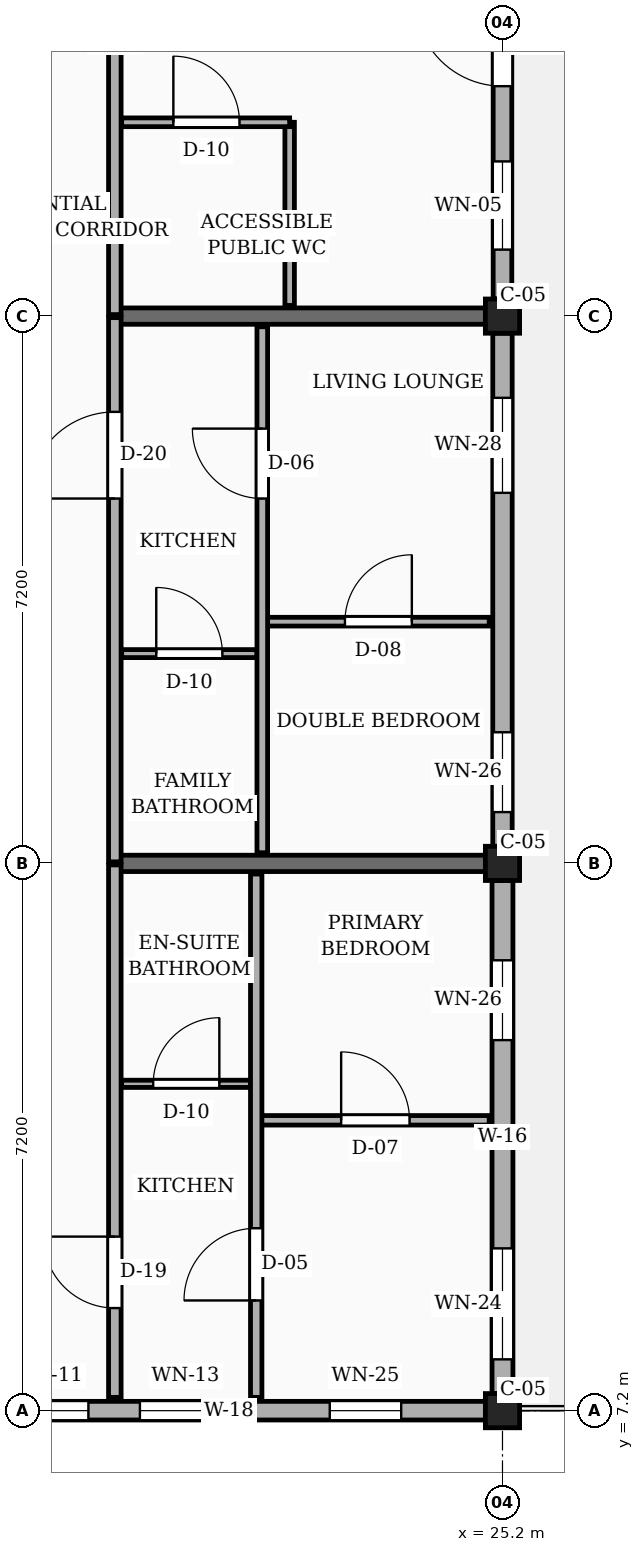
"""IFC4 building model, lengths in metres.
Left out: names, types, materials, properties, quantities, classifications, styles, units other than length and angle.
Written with IfcOpenShell. Run it as: python <this file> out.ifc"""

import sys

from ifc_helpers import new_model, si_unit, direction, frame, frame_2d, origin, origin_2d, place, context, subcontext, project, spatial, rectangle, extrude, element, fill, save


model = new_model("IFC4")
c1 = context("Model", 3, precision=1e-05, world=origin(), true_north=direction((0.0, 1.0)))
c2 = subcontext(c1, "Body", "Model", "MODEL_VIEW")
j1 = project(units=[si_unit("LENGTHUNIT", "METRE"), si_unit("PLANEANGLEUNIT", "RADIAN")], contexts=[c1])
p1 = place(None, origin())
s1 = spatial("IfcSite", under=j1, at=p1, CompositionType="ELEMENT")
p2 = place(p1, origin())
s2 = spatial("IfcBuilding", under=s1, at=p2, CompositionType="ELEMENT")
p3 = place(p2, frame((0.0, 0.0, 36.0)))
s3 = spatial("IfcBuildingStorey", under=s2, at=p3, CompositionType="ELEMENT", Elevation=36.0)
for number, where, z_axis, x_axis in (
    (1, (25.2, 7.2, 0.0), (0.0, 0.0, 1.0), (1.0, 0.0, 0.0)),
    (2, (25.2, 14.4, 0.0), (0.0, 0.0, 1.0), (1.0, 0.0, 0.0)),
    (3, (25.2, 21.6, 0.0), (0.0, 0.0, 1.0), (1.0, 0.0, 0.0)),
):
    element("IfcColumn", number, at=place(p3, frame(where, z_axis=z_axis, x_axis=x_axis)), inside=s3, PredefinedType="COLUMN", context=c2, shape_type="SweptSolid", body=[
        extrude(rectangle(XDim=0.45, YDim=0.45, at=origin_2d()), origin(), (0.0, 0.0, 1.0), 3.15),
    ])
for number, where, z_axis, x_axis in (
    (4, (20.1, 14.4, 0.0), (0.0, 0.0, 1.0), (1.0, 0.0, 0.0)),
    (5, (20.1, 21.6, 0.0), (0.0, 0.0, 1.0), (1.0, 0.0, 0.0)),
):
    element("IfcWall", number, at=place(p3, frame(where, z_axis=z_axis, x_axis=x_axis)), inside=s3, PredefinedType="SOLIDWALL", context=c2, shape_type="SweptSolid", body=[
        extrude(rectangle(XDim=4.875, YDim=0.215, at=frame_2d((2.438, 0.0))), origin(), (0.0, 0.0, 1.0), 2.17),
    ])
p4 = place(p3, frame((18.225, 7.2, 0.0), z_axis=(0.0, 0.0, 1.0), x_axis=(1.0, 0.0, 0.0)))
e6 = element("IfcWall", 6, at=p4, inside=s3, PredefinedType="SOLIDWALL", context=c2, shape_type="SweptSolid", body=[
    extrude(rectangle(XDim=6.75, YDim=0.245, at=frame_2d((3.375, 0.0))), origin(), (0.0, 0.0, 1.0), 2.44),
])
p5 = place(p4, frame((0.488, 0.0, 0.78)))
e7 = element("IfcOpeningElement", 7, at=p5, cuts=e6, PredefinedType="OPENING", context=c2, shape_type="SweptSolid", body=[
    extrude(rectangle(XDim=1.04, YDim=1.26, at=frame_2d((0.52, 0.63))), frame((0.0, 0.133, 0.0), z_axis=(0.0, -1.0, 0.0), x_axis=(1.0, 0.0, 0.0)), (0.0, 0.0, 1.0), 0.265),
])
p6 = place(p4, frame((2.205, 0.0, 0.78)))
e8 = element("IfcOpeningElement", 8, at=p6, cuts=e6, PredefinedType="OPENING", context=c2, shape_type="SweptSolid", body=[
    extrude(rectangle(XDim=1.2, YDim=1.26, at=frame_2d((0.6, 0.63))), frame((0.0, 0.133, 0.0), z_axis=(0.0, -1.0, 0.0), x_axis=(1.0, 0.0, 0.0)), (0.0, 0.0, 1.0), 0.265),
])
p7 = place(p4, frame((4.702, 0.0, 0.78)))
e9 = element("IfcOpeningElement", 9, at=p7, cuts=e6, PredefinedType="OPENING", context=c2, shape_type="SweptSolid", body=[
    extrude(rectangle(XDim=0.94, YDim=1.44, at=frame_2d((0.47, 0.72))), frame((0.0, 0.133, 0.0), z_axis=(0.0, -1.0, 0.0), x_axis=(1.0, 0.0, 0.0)), (0.0, 0.0, 1.0), 0.265),
])
p8 = place(p3, frame((25.2, 7.425, 0.0), z_axis=(0.0, 0.0, 1.0), x_axis=(0.0, 1.0, 0.0)))
e10 = element("IfcWall", 10, at=p8, inside=s3, PredefinedType="SOLIDWALL", context=c2, shape_type="SweptSolid", body=[
    extrude(rectangle(XDim=6.75, YDim=0.275, at=frame_2d((3.375, 0.0))), origin(), (0.0, 0.0, 1.0), 2.44),
])
p9 = place(p8, frame((0.45, 0.0, 0.78)))
e11 = element("IfcOpeningElement", 11, at=p9, cuts=e10, PredefinedType="OPENING", context=c2, shape_type="SweptSolid", body=[
    extrude(rectangle(XDim=1.46, YDim=1.36, at=frame_2d((0.73, 0.68))), frame((0.0, 0.147, 0.0), z_axis=(0.0, -1.0, 0.0), x_axis=(1.0, 0.0, 0.0)), (0.0, 0.0, 1.0), 0.295),
])
p10 = place(p8, frame((4.65, 0.0, 0.78)))
e12 = element("IfcOpeningElement", 12, at=p10, cuts=e10, PredefinedType="OPENING", context=c2, shape_type="SweptSolid", body=[
    extrude(rectangle(XDim=1.05, YDim=1.44, at=frame_2d((0.525, 0.72))), frame((0.0, 0.147, 0.0), z_axis=(0.0, -1.0, 0.0), x_axis=(1.0, 0.0, 0.0)), (0.0, 0.0, 1.0), 0.295),
])
p11 = place(p3, frame((25.2, 14.625, 0.0), z_axis=(0.0, 0.0, 1.0), x_axis=(0.0, 1.0, 0.0)))
e13 = element("IfcWall", 13, at=p11, inside=s3, PredefinedType="SOLIDWALL", context=c2, shape_type="SweptSolid", body=[
    extrude(rectangle(XDim=6.75, YDim=0.255, at=frame_2d((3.375, 0.0))), origin(), (0.0, 0.0, 1.0), 2.44),
])
p12 = place(p11, frame((0.45, 0.0, 0.78)))
e14 = element("IfcOpeningElement", 14, at=p12, cuts=e13, PredefinedType="OPENING", context=c2, shape_type="SweptSolid", body=[
    extrude(rectangle(XDim=1.05, YDim=1.44, at=frame_2d((0.525, 0.72))), frame((0.0, 0.137, 0.0), z_axis=(0.0, -1.0, 0.0), x_axis=(1.0, 0.0, 0.0)), (0.0, 0.0, 1.0), 0.275),
])
p13 = place(p11, frame((4.65, 0.0, 0.78)))
e15 = element("IfcOpeningElement", 15, at=p13, cuts=e13, PredefinedType="OPENING", context=c2, shape_type="SweptSolid", body=[
    extrude(rectangle(XDim=1.25, YDim=1.44, at=frame_2d((0.625, 0.72))), frame((0.0, 0.137, 0.0), z_axis=(0.0, -1.0, 0.0), x_axis=(1.0, 0.0, 0.0)), (0.0, 0.0, 1.0), 0.275),
])
p14 = place(p3, frame((25.2, 21.825, 0.0), z_axis=(0.0, 0.0, 1.0), x_axis=(0.0, 1.0, 0.0)))
e16 = element("IfcWall", 16, at=p14, inside=s3, PredefinedType="SOLIDWALL", context=c2, shape_type="SweptSolid", body=[
    extrude(rectangle(XDim=6.75, YDim=0.245, at=frame_2d((3.375, 0.0))), origin(), (0.0, 0.0, 1.0), 2.44),
])
p15 = place(p14, frame((2.8, 0.0, 0.0)))
e17 = element("IfcOpeningElement", 17, at=p15, cuts=e16, PredefinedType="OPENING", context=c2, shape_type="SweptSolid", body=[
    extrude(rectangle(XDim=1.15, YDim=2.12, at=frame_2d((0.575, 1.06))), frame((0.0, 0.133, 0.0), z_axis=(0.0, -1.0, 0.0), x_axis=(1.0, 0.0, 0.0)), (0.0, 0.0, 1.0), 0.265),
])
p16 = place(p14, frame((0.65, 0.0, 0.78)))
e18 = element("IfcOpeningElement", 18, at=p16, cuts=e16, PredefinedType="OPENING", context=c2, shape_type="SweptSolid", body=[
    extrude(rectangle(XDim=1.16, YDim=1.15, at=frame_2d((0.58, 0.575))), frame((0.0, 0.133, 0.0), z_axis=(0.0, -1.0, 0.0), x_axis=(1.0, 0.0, 0.0)), (0.0, 0.0, 1.0), 0.265),
])
p17 = place(p3, frame((20.1, 7.375, 0.0), z_axis=(0.0, 0.0, 1.0), x_axis=(0.0, 1.0, 0.0)))
e19 = element("IfcWall", 19, at=p17, inside=s3, PredefinedType="PARTITIONING", context=c2, shape_type="SweptSolid", body=[
    extrude(rectangle(XDim=7.005, YDim=0.165, at=frame_2d((3.502, 0.0))), origin(), (0.0, 0.0, 1.0), 2.305),
])
p18 = place(p17, frame((1.175, 0.0, 0.0)))
e20 = element("IfcOpeningElement", 20, at=p18, cuts=e19, PredefinedType="OPENING", context=c2, shape_type="SweptSolid", body=[
    extrude(rectangle(XDim=0.94, YDim=2.12, at=frame_2d((0.47, 1.06))), frame((0.0, 0.093, 0.0), z_axis=(0.0, -1.0, 0.0), x_axis=(1.0, 0.0, 0.0)), (0.0, 0.0, 1.0), 0.185),
])
p19 = place(p3, frame((20.1, 14.42, 0.0), z_axis=(0.0, 0.0, 1.0), x_axis=(0.0, 1.0, 0.0)))
e21 = element("IfcWall", 21, at=p19, inside=s3, PredefinedType="PARTITIONING", context=c2, shape_type="SweptSolid", body=[
    extrude(rectangle(XDim=7.16, YDim=0.165, at=frame_2d((3.58, 0.0))), origin(), (0.0, 0.0, 1.0), 2.305),
])
p20 = place(p19, frame((4.78, 0.0, 0.0)))
e22 = element("IfcOpeningElement", 22, at=p20, cuts=e21, PredefinedType="OPENING", context=c2, shape_type="SweptSolid", body=[
    extrude(rectangle(XDim=1.14, YDim=2.18, at=frame_2d((0.57, 1.09))), frame((0.0, 0.093, 0.0), z_axis=(0.0, -1.0, 0.0), x_axis=(1.0, 0.0, 0.0)), (0.0, 0.0, 1.0), 0.185),
])
p21 = place(p3, frame((20.1, 21.62, 0.0), z_axis=(0.0, 0.0, 1.0), x_axis=(0.0, 1.0, 0.0)))
e23 = element("IfcWall", 23, at=p21, inside=s3, PredefinedType="PARTITIONING", context=c2, shape_type="SweptSolid", body=[
    extrude(rectangle(XDim=7.16, YDim=0.165, at=frame_2d((3.58, 0.0))), origin(), (0.0, 0.0, 1.0), 2.305),
])
p22 = place(p21, frame((4.33, 0.0, 0.0)))
e24 = element("IfcOpeningElement", 24, at=p22, cuts=e23, PredefinedType="OPENING", context=c2, shape_type="SweptSolid", body=[
    extrude(rectangle(XDim=1.1, YDim=2.15, at=frame_2d((0.55, 1.075))), frame((0.0, 0.093, 0.0), z_axis=(0.0, -1.0, 0.0), x_axis=(1.0, 0.0, 0.0)), (0.0, 0.0, 1.0), 0.185),
])
p23 = place(p3, frame((22.03, 11.02, 0.0), z_axis=(0.0, 0.0, 1.0), x_axis=(1.0, 0.0, 0.0)))
e25 = element("IfcWall", 25, at=p23, inside=s3, PredefinedType="PARTITIONING", context=c2, shape_type="SweptSolid", body=[
    extrude(rectangle(XDim=2.995, YDim=0.125, at=frame_2d((1.498, 0.0))), origin(), (0.0, 0.0, 1.0), 2.305),
])
p24 = place(p23, frame((1.048, 0.0, 0.0)))
e26 = element("IfcOpeningElement", 26, at=p24, cuts=e25, PredefinedType="OPENING", context=c2, shape_type="SweptSolid", body=[
    extrude(rectangle(XDim=0.9, YDim=2.1, at=frame_2d((0.45, 1.05))), frame((0.0, 0.073, 0.0), z_axis=(0.0, -1.0, 0.0), x_axis=(1.0, 0.0, 0.0)), (0.0, 0.0, 1.0), 0.145),
])
p25 = place(p3, frame((20.19, 11.5, 0.0), z_axis=(0.0, 0.0, 1.0), x_axis=(1.0, 0.0, 0.0)))
e27 = element("IfcWall", 27, at=p25, inside=s3, PredefinedType="PARTITIONING", context=c2, shape_type="SweptSolid", body=[
    extrude(rectangle(XDim=1.7, YDim=0.095, at=frame_2d((0.85, 0.0))), origin(), (0.0, 0.0, 1.0), 2.305),
])
p26 = place(p25, frame((0.415, 0.0, 0.0)))
e28 = element("IfcOpeningElement", 28, at=p26, cuts=e27, PredefinedType="OPENING", context=c2, shape_type="SweptSolid", body=[
    extrude(rectangle(XDim=0.87, YDim=2.05, at=frame_2d((0.435, 1.025))), frame((0.0, 0.058, 0.0), z_axis=(0.0, -1.0, 0.0), x_axis=(1.0, 0.0, 0.0)), (0.0, 0.0, 1.0), 0.115),
])
p27 = place(p3, frame((21.96, 7.375, 0.0), z_axis=(0.0, 0.0, 1.0), x_axis=(0.0, 1.0, 0.0)))
e29 = element("IfcWall", 29, at=p27, inside=s3, PredefinedType="PARTITIONING", context=c2, shape_type="SweptSolid", body=[
    extrude(rectangle(XDim=6.885, YDim=0.15, at=frame_2d((3.442, 0.0))), origin(), (0.0, 0.0, 1.0), 2.305),
])
p28 = place(p27, frame((1.275, 0.0, 0.0)))
e30 = element("IfcOpeningElement", 30, at=p28, cuts=e29, PredefinedType="OPENING", context=c2, shape_type="SweptSolid", body=[
    extrude(rectangle(XDim=0.95, YDim=2.1, at=frame_2d((0.475, 1.05))), frame((0.0, 0.085, 0.0), z_axis=(0.0, -1.0, 0.0), x_axis=(1.0, 0.0, 0.0)), (0.0, 0.0, 1.0), 0.17),
])
p29 = place(p3, frame((22.11, 17.58, 0.0), z_axis=(0.0, 0.0, 1.0), x_axis=(1.0, 0.0, 0.0)))
e31 = element("IfcWall", 31, at=p29, inside=s3, PredefinedType="PARTITIONING", context=c2, shape_type="SweptSolid", body=[
    extrude(rectangle(XDim=2.915, YDim=0.115, at=frame_2d((1.458, 0.0))), origin(), (0.0, 0.0, 1.0), 2.305),
])
p30 = place(p29, frame((1.018, 0.0, 0.0)))
e32 = element("IfcOpeningElement", 32, at=p30, cuts=e31, PredefinedType="OPENING", context=c2, shape_type="SweptSolid", body=[
    extrude(rectangle(XDim=0.88, YDim=2.08, at=frame_2d((0.44, 1.04))), frame((0.0, 0.067, 0.0), z_axis=(0.0, -1.0, 0.0), x_axis=(1.0, 0.0, 0.0)), (0.0, 0.0, 1.0), 0.135),
])
p31 = place(p3, frame((20.19, 17.16, 0.0), z_axis=(0.0, 0.0, 1.0), x_axis=(1.0, 0.0, 0.0)))
e33 = element("IfcWall", 33, at=p31, inside=s3, PredefinedType="PARTITIONING", context=c2, shape_type="SweptSolid", body=[
    extrude(rectangle(XDim=1.78, YDim=0.105, at=frame_2d((0.89, 0.0))), origin(), (0.0, 0.0, 1.0), 2.305),
])
p32 = place(p31, frame((0.455, 0.0, 0.0)))
e34 = element("IfcOpeningElement", 34, at=p32, cuts=e33, PredefinedType="OPENING", context=c2, shape_type="SweptSolid", body=[
    extrude(rectangle(XDim=0.87, YDim=2.05, at=frame_2d((0.435, 1.025))), frame((0.0, 0.062, 0.0), z_axis=(0.0, -1.0, 0.0), x_axis=(1.0, 0.0, 0.0)), (0.0, 0.0, 1.0), 0.125),
])
p33 = place(p3, frame((22.04, 14.54, 0.0), z_axis=(0.0, 0.0, 1.0), x_axis=(0.0, 1.0, 0.0)))
e35 = element("IfcWall", 35, at=p33, inside=s3, PredefinedType="PARTITIONING", context=c2, shape_type="SweptSolid", body=[
    extrude(rectangle(XDim=6.92, YDim=0.14, at=frame_2d((3.46, 0.0))), origin(), (0.0, 0.0, 1.0), 2.305),
])
p34 = place(p33, frame((4.66, 0.0, 0.0)))
e36 = element("IfcOpeningElement", 36, at=p34, cuts=e35, PredefinedType="OPENING", context=c2, shape_type="SweptSolid", body=[
    extrude(rectangle(XDim=0.92, YDim=2.1, at=frame_2d((0.46, 1.05))), frame((0.0, 0.08, 0.0), z_axis=(0.0, -1.0, 0.0), x_axis=(1.0, 0.0, 0.0)), (0.0, 0.0, 1.0), 0.16),
])
p35 = place(p3, frame((22.4, 21.74, 0.0), z_axis=(0.0, 0.0, 1.0), x_axis=(0.0, 1.0, 0.0)))
e37 = element("IfcWall", 37, at=p35, inside=s3, PredefinedType="PARTITIONING", context=c2, shape_type="SweptSolid", body=[
    extrude(rectangle(XDim=2.41, YDim=0.125, at=frame_2d((1.205, 0.0))), origin(), (0.0, 0.0, 1.0), 2.305),
])
p36 = place(p3, frame((20.19, 24.15, 0.0), z_axis=(0.0, 0.0, 1.0), x_axis=(1.0, 0.0, 0.0)))
e38 = element("IfcWall", 38, at=p36, inside=s3, PredefinedType="PARTITIONING", context=c2, shape_type="SweptSolid", body=[
    extrude(rectangle(XDim=2.21, YDim=0.115, at=frame_2d((1.105, 0.0))), origin(), (0.0, 0.0, 1.0), 2.305),
])
p37 = place(p36, frame((0.68, 0.0, 0.0)))
e39 = element("IfcOpeningElement", 39, at=p37, cuts=e38, PredefinedType="OPENING", context=c2, shape_type="SweptSolid", body=[
    extrude(rectangle(XDim=0.87, YDim=2.05, at=frame_2d((0.435, 1.025))), frame((0.0, 0.067, 0.0), z_axis=(0.0, -1.0, 0.0), x_axis=(1.0, 0.0, 0.0)), (0.0, 0.0, 1.0), 0.135),
])
p38 = place(p5, origin())
e40 = element("IfcWindow", 40, at=p38, inside=s3, PartitioningType="SINGLE_PANEL", PredefinedType="WINDOW", context=c2, shape_type="SweptSolid", body=[
    extrude(rectangle(XDim=1.04, YDim=1.26, at=frame_2d((0.52, 0.63))), frame((0.0, 0.03, 0.0), z_axis=(0.0, -1.0, 0.0), x_axis=(1.0, 0.0, 0.0)), (0.0, 0.0, 1.0), 0.06),
])
fill(e7, e40)
p39 = place(p6, origin())
e41 = element("IfcWindow", 41, at=p39, inside=s3, PartitioningType="SINGLE_PANEL", PredefinedType="WINDOW", context=c2, shape_type="SweptSolid", body=[
    extrude(rectangle(XDim=1.2, YDim=1.26, at=frame_2d((0.6, 0.63))), frame((0.0, 0.03, 0.0), z_axis=(0.0, -1.0, 0.0), x_axis=(1.0, 0.0, 0.0)), (0.0, 0.0, 1.0), 0.06),
])
fill(e8, e41)
p40 = place(p7, origin())
e42 = element("IfcWindow", 42, at=p40, inside=s3, PartitioningType="SINGLE_PANEL", PredefinedType="WINDOW", context=c2, shape_type="SweptSolid", body=[
    extrude(rectangle(XDim=0.94, YDim=1.44, at=frame_2d((0.47, 0.72))), frame((0.0, 0.03, 0.0), z_axis=(0.0, -1.0, 0.0), x_axis=(1.0, 0.0, 0.0)), (0.0, 0.0, 1.0), 0.06),
])
fill(e9, e42)
p41 = place(p9, origin())
e43 = element("IfcWindow", 43, at=p41, inside=s3, PartitioningType="SINGLE_PANEL", PredefinedType="WINDOW", context=c2, shape_type="SweptSolid", body=[
    extrude(rectangle(XDim=1.46, YDim=1.36, at=frame_2d((0.73, 0.68))), frame((0.0, 0.03, 0.0), z_axis=(0.0, -1.0, 0.0), x_axis=(1.0, 0.0, 0.0)), (0.0, 0.0, 1.0), 0.06),
])
fill(e11, e43)
p42 = place(p10, origin())
e44 = element("IfcWindow", 44, at=p42, inside=s3, PartitioningType="SINGLE_PANEL", PredefinedType="WINDOW", context=c2, shape_type="SweptSolid", body=[
    extrude(rectangle(XDim=1.05, YDim=1.44, at=frame_2d((0.525, 0.72))), frame((0.0, 0.03, 0.0), z_axis=(0.0, -1.0, 0.0), x_axis=(1.0, 0.0, 0.0)), (0.0, 0.0, 1.0), 0.06),
])
fill(e12, e44)
p43 = place(p12, origin())
e45 = element("IfcWindow", 45, at=p43, inside=s3, PartitioningType="SINGLE_PANEL", PredefinedType="WINDOW", context=c2, shape_type="SweptSolid", body=[
    extrude(rectangle(XDim=1.05, YDim=1.44, at=frame_2d((0.525, 0.72))), frame((0.0, 0.03, 0.0), z_axis=(0.0, -1.0, 0.0), x_axis=(1.0, 0.0, 0.0)), (0.0, 0.0, 1.0), 0.06),
])
fill(e14, e45)
p44 = place(p13, origin())
e46 = element("IfcWindow", 46, at=p44, inside=s3, PartitioningType="SINGLE_PANEL", PredefinedType="WINDOW", context=c2, shape_type="SweptSolid", body=[
    extrude(rectangle(XDim=1.25, YDim=1.44, at=frame_2d((0.625, 0.72))), frame((0.0, 0.03, 0.0), z_axis=(0.0, -1.0, 0.0), x_axis=(1.0, 0.0, 0.0)), (0.0, 0.0, 1.0), 0.06),
])
fill(e15, e46)
p45 = place(p15, frame((1.15, 0.0, 0.0), z_axis=(0.0, 0.0, 1.0), x_axis=(-1.0, 0.0, 0.0)))
e47 = element("IfcDoor", 47, at=p45, inside=s3, OperationType="SINGLE_SWING_RIGHT", PredefinedType="DOOR", context=c2, shape_type="SweptSolid", body=[
    extrude(rectangle(XDim=1.15, YDim=2.12, at=frame_2d((0.575, 1.06))), frame((0.0, 0.025, 0.0), z_axis=(0.0, -1.0, 0.0), x_axis=(1.0, 0.0, 0.0)), (0.0, 0.0, 1.0), 0.05),
])
fill(e17, e47)
p46 = place(p16, origin())
e48 = element("IfcWindow", 48, at=p46, inside=s3, PartitioningType="SINGLE_PANEL", PredefinedType="WINDOW", context=c2, shape_type="SweptSolid", body=[
    extrude(rectangle(XDim=1.16, YDim=1.15, at=frame_2d((0.58, 0.575))), frame((0.0, 0.03, 0.0), z_axis=(0.0, -1.0, 0.0), x_axis=(1.0, 0.0, 0.0)), (0.0, 0.0, 1.0), 0.06),
])
fill(e18, e48)
p47 = place(p18, origin())
e49 = element("IfcDoor", 49, at=p47, inside=s3, OperationType="SINGLE_SWING_RIGHT", PredefinedType="DOOR", context=c2, shape_type="SweptSolid", body=[
    extrude(rectangle(XDim=0.94, YDim=2.12, at=frame_2d((0.47, 1.06))), frame((0.0, 0.025, 0.0), z_axis=(0.0, -1.0, 0.0), x_axis=(1.0, 0.0, 0.0)), (0.0, 0.0, 1.0), 0.05),
])
fill(e20, e49)
p48 = place(p20, origin())
e50 = element("IfcDoor", 50, at=p48, inside=s3, OperationType="SINGLE_SWING_LEFT", PredefinedType="DOOR", context=c2, shape_type="SweptSolid", body=[
    extrude(rectangle(XDim=1.14, YDim=2.18, at=frame_2d((0.57, 1.09))), frame((0.0, 0.025, 0.0), z_axis=(0.0, -1.0, 0.0), x_axis=(1.0, 0.0, 0.0)), (0.0, 0.0, 1.0), 0.05),
])
fill(e22, e50)
p49 = place(p24, origin())
e51 = element("IfcDoor", 51, at=p49, inside=s3, OperationType="SINGLE_SWING_LEFT", PredefinedType="DOOR", context=c2, shape_type="SweptSolid", body=[
    extrude(rectangle(XDim=0.9, YDim=2.1, at=frame_2d((0.45, 1.05))), frame((0.0, 0.025, 0.0), z_axis=(0.0, -1.0, 0.0), x_axis=(1.0, 0.0, 0.0)), (0.0, 0.0, 1.0), 0.05),
])
fill(e26, e51)
p50 = place(p26, origin())
e52 = element("IfcDoor", 52, at=p50, inside=s3, OperationType="SINGLE_SWING_RIGHT", PredefinedType="DOOR", context=c2, shape_type="SweptSolid", body=[
    extrude(rectangle(XDim=0.87, YDim=2.05, at=frame_2d((0.435, 1.025))), frame((0.0, 0.025, 0.0), z_axis=(0.0, -1.0, 0.0), x_axis=(1.0, 0.0, 0.0)), (0.0, 0.0, 1.0), 0.05),
])
fill(e28, e52)
p51 = place(p28, origin())
e53 = element("IfcDoor", 53, at=p51, inside=s3, OperationType="SINGLE_SWING_LEFT", PredefinedType="DOOR", context=c2, shape_type="SweptSolid", body=[
    extrude(rectangle(XDim=0.95, YDim=2.1, at=frame_2d((0.475, 1.05))), frame((0.0, 0.025, 0.0), z_axis=(0.0, -1.0, 0.0), x_axis=(1.0, 0.0, 0.0)), (0.0, 0.0, 1.0), 0.05),
])
fill(e30, e53)
p52 = place(p30, origin())
e54 = element("IfcDoor", 54, at=p52, inside=s3, OperationType="SINGLE_SWING_RIGHT", PredefinedType="DOOR", context=c2, shape_type="SweptSolid", body=[
    extrude(rectangle(XDim=0.88, YDim=2.08, at=frame_2d((0.44, 1.04))), frame((0.0, 0.025, 0.0), z_axis=(0.0, -1.0, 0.0), x_axis=(1.0, 0.0, 0.0)), (0.0, 0.0, 1.0), 0.05),
])
fill(e32, e54)
p53 = place(p32, origin())
e55 = element("IfcDoor", 55, at=p53, inside=s3, OperationType="SINGLE_SWING_LEFT", PredefinedType="DOOR", context=c2, shape_type="SweptSolid", body=[
    extrude(rectangle(XDim=0.87, YDim=2.05, at=frame_2d((0.435, 1.025))), frame((0.0, 0.025, 0.0), z_axis=(0.0, -1.0, 0.0), x_axis=(1.0, 0.0, 0.0)), (0.0, 0.0, 1.0), 0.05),
])
fill(e34, e55)
p54 = place(p34, origin())
e56 = element("IfcDoor", 56, at=p54, inside=s3, OperationType="SINGLE_SWING_RIGHT", PredefinedType="DOOR", context=c2, shape_type="SweptSolid", body=[
    extrude(rectangle(XDim=0.92, YDim=2.1, at=frame_2d((0.46, 1.05))), frame((0.0, 0.025, 0.0), z_axis=(0.0, -1.0, 0.0), x_axis=(1.0, 0.0, 0.0)), (0.0, 0.0, 1.0), 0.05),
])
fill(e36, e56)
p55 = place(p37, origin())
e57 = element("IfcDoor", 57, at=p55, inside=s3, OperationType="SINGLE_SWING_LEFT", PredefinedType="DOOR", context=c2, shape_type="SweptSolid", body=[
    extrude(rectangle(XDim=0.87, YDim=2.05, at=frame_2d((0.435, 1.025))), frame((0.0, 0.025, 0.0), z_axis=(0.0, -1.0, 0.0), x_axis=(1.0, 0.0, 0.0)), (0.0, 0.0, 1.0), 0.05),
])
fill(e39, e57)
save(model, sys.argv[1])
